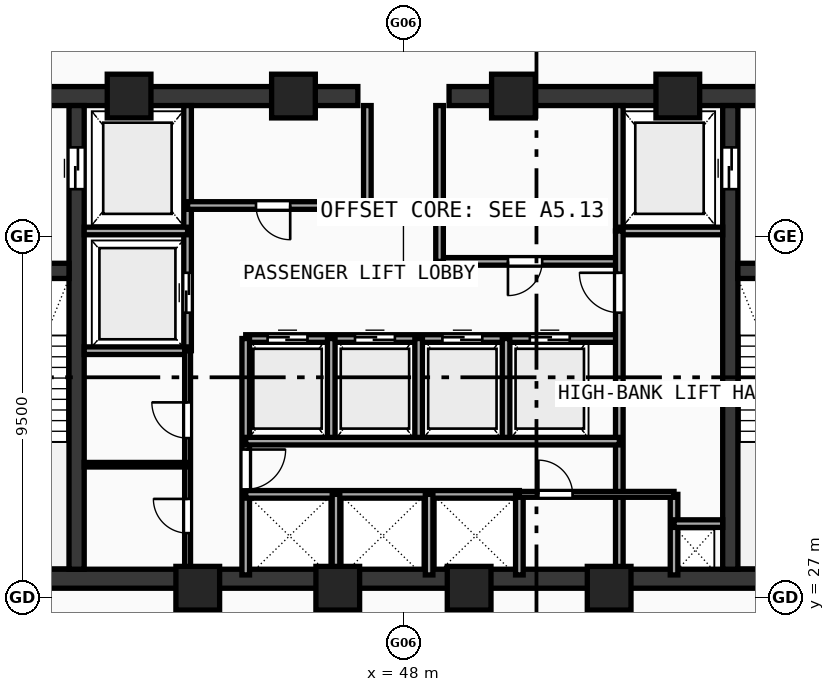
"""IFC4 building model, lengths in metres.
Left out: names, types, materials, properties, quantities, classifications, styles, units other than length and angle.
Written with IfcOpenShell. Run it as: python <this file> out.ifc"""

import sys

from ifc_helpers import new_model, si_unit, direction, frame, frame_2d, origin, origin_with_axes, origin_2d, place, context, subcontext, project, spatial, rectangle, hollow_rectangle, extrude, source, transform, mapped, element, fill, save


model = new_model("IFC4")
c1 = context("Model", 3, precision=1e-05, world=origin(), true_north=direction((0.0, 1.0)))
c2 = subcontext(c1, "Body", "Model", "MODEL_VIEW")
j1 = project(units=[si_unit("LENGTHUNIT", "METRE"), si_unit("PLANEANGLEUNIT", "RADIAN")], contexts=[c1])
p1 = place(None, origin())
s1 = spatial("IfcSite", under=j1, at=p1, CompositionType="ELEMENT")
p2 = place(p1, origin())
s2 = spatial("IfcBuilding", under=s1, at=p2, CompositionType="ELEMENT")
p3 = place(p2, frame((0.0, 0.0, 188.56)))
s3 = spatial("IfcBuildingStorey", under=s2, at=p3, CompositionType="ELEMENT", Elevation=188.56)
p4 = place(p3, frame((35.55, 27.5, 0.0), z_axis=(0.0, 0.0, 1.0), x_axis=(1.0, 0.0, 0.0)))
e1 = element("IfcWall", 1, at=p4, inside=s3, PredefinedType="SHEAR", context=c2, shape_type="SweptSolid", body=[
    extrude(rectangle(XDim=24.9, YDim=0.5, at=frame_2d((12.45, 0.0))), origin(), (0.0, 0.0, 1.0), 3.54),
])
p5 = place(p3, frame((35.55, 40.2, 0.0), z_axis=(0.0, 0.0, 1.0), x_axis=(1.0, 0.0, 0.0)))
e2 = element("IfcWall", 2, at=p5, inside=s3, PredefinedType="SHEAR", context=c2, shape_type="SweptSolid", body=[
    extrude(rectangle(XDim=11.25, YDim=0.5, at=frame_2d((5.625, 0.0))), origin(), (0.0, 0.0, 1.0), 3.54),
])
p6 = place(p5, frame((1.6, 0.0, 0.0)))
e3 = element("IfcOpeningElement", 3, at=p6, cuts=e2, PredefinedType="OPENING", context=c2, shape_type="SweptSolid", body=[
    extrude(rectangle(XDim=1.05, YDim=2.1, at=frame_2d((0.525, 1.05))), frame((0.0, 0.26, 0.0), z_axis=(0.0, -1.0, 0.0), x_axis=(1.0, 0.0, 0.0)), (0.0, 0.0, 1.0), 0.52),
])
p7 = place(p3, frame((49.2, 40.2, 0.0), z_axis=(0.0, 0.0, 1.0), x_axis=(1.0, 0.0, 0.0)))
e4 = element("IfcWall", 4, at=p7, inside=s3, PredefinedType="SHEAR", context=c2, shape_type="SweptSolid", body=[
    extrude(rectangle(XDim=11.25, YDim=0.5, at=frame_2d((5.625, 0.0))), origin(), (0.0, 0.0, 1.0), 3.54),
])
p8 = place(p7, frame((8.6, 0.0, 0.0)))
e5 = element("IfcOpeningElement", 5, at=p8, cuts=e4, PredefinedType="OPENING", context=c2, shape_type="SweptSolid", body=[
    extrude(rectangle(XDim=1.05, YDim=2.1, at=frame_2d((0.525, 1.05))), frame((0.0, 0.26, 0.0), z_axis=(0.0, -1.0, 0.0), x_axis=(1.0, 0.0, 0.0)), (0.0, 0.0, 1.0), 0.52),
])
p9 = place(p3, frame((39.4, 27.75, 0.0), z_axis=(0.0, 0.0, 1.0), x_axis=(0.0, 1.0, 0.0)))
e6 = element("IfcWall", 6, at=p9, inside=s3, PredefinedType="SHEAR", context=c2, shape_type="SweptSolid", body=[
    extrude(rectangle(XDim=12.2, YDim=0.4, at=frame_2d((6.1, 0.0))), origin(), (0.0, 0.0, 1.0), 3.54),
])
p10 = place(p9, frame((10.0, 0.0, 0.0)))
e7 = element("IfcOpeningElement", 7, at=p10, cuts=e6, PredefinedType="OPENING", context=c2, shape_type="SweptSolid", body=[
    extrude(rectangle(XDim=1.1, YDim=2.1, at=frame_2d((0.55, 1.05))), frame((0.0, 0.21, 0.0), z_axis=(0.0, -1.0, 0.0), x_axis=(1.0, 0.0, 0.0)), (0.0, 0.0, 1.0), 0.42),
])
p11 = place(p3, frame((56.6, 27.75, 0.0), z_axis=(0.0, 0.0, 1.0), x_axis=(0.0, 1.0, 0.0)))
e8 = element("IfcWall", 8, at=p11, inside=s3, PredefinedType="SHEAR", context=c2, shape_type="SweptSolid", body=[
    extrude(rectangle(XDim=12.2, YDim=0.4, at=frame_2d((6.1, 0.0))), origin(), (0.0, 0.0, 1.0), 3.54),
])
p12 = place(p11, frame((10.0, 0.0, 0.0)))
e9 = element("IfcOpeningElement", 9, at=p12, cuts=e8, PredefinedType="OPENING", context=c2, shape_type="SweptSolid", body=[
    extrude(rectangle(XDim=1.1, YDim=2.1, at=frame_2d((0.55, 1.05))), frame((0.0, 0.21, 0.0), z_axis=(0.0, -1.0, 0.0), x_axis=(1.0, 0.0, 0.0)), (0.0, 0.0, 1.0), 0.42),
])
p13 = place(p3, frame((36.05, 35.6, 0.0), z_axis=(0.0, 0.0, 1.0), x_axis=(1.0, 0.0, 0.0)))
e10 = element("IfcWall", 10, at=p13, inside=s3, PredefinedType="SHEAR", context=c2, shape_type="SweptSolid", body=[
    extrude(rectangle(XDim=3.15, YDim=0.4, at=frame_2d((1.575, 0.0))), origin(), (0.0, 0.0, 1.0), 3.54),
])
p14 = place(p13, frame((1.07, 0.0, 0.0)))
e11 = element("IfcOpeningElement", 11, at=p14, cuts=e10, PredefinedType="OPENING", context=c2, shape_type="SweptSolid", body=[
    extrude(rectangle(XDim=1.05, YDim=2.1, at=frame_2d((0.525, 1.05))), frame((0.0, 0.21, 0.0), z_axis=(0.0, -1.0, 0.0), x_axis=(1.0, 0.0, 0.0)), (0.0, 0.0, 1.0), 0.42),
])
p15 = place(p3, frame((56.8, 35.6, 0.0), z_axis=(0.0, 0.0, 1.0), x_axis=(1.0, 0.0, 0.0)))
e12 = element("IfcWall", 12, at=p15, inside=s3, PredefinedType="SHEAR", context=c2, shape_type="SweptSolid", body=[
    extrude(rectangle(XDim=3.15, YDim=0.4, at=frame_2d((1.575, 0.0))), origin(), (0.0, 0.0, 1.0), 3.54),
])
p16 = place(p15, frame((1.02, 0.0, 0.0)))
e13 = element("IfcOpeningElement", 13, at=p16, cuts=e12, PredefinedType="OPENING", context=c2, shape_type="SweptSolid", body=[
    extrude(rectangle(XDim=1.05, YDim=2.1, at=frame_2d((0.525, 1.05))), frame((0.0, 0.21, 0.0), z_axis=(0.0, -1.0, 0.0), x_axis=(1.0, 0.0, 0.0)), (0.0, 0.0, 1.0), 0.42),
])
m1 = source(origin(), c2, "Body", "SweptSolid", [
    extrude(hollow_rectangle(XDim=1.15, YDim=1.15, WallThickness=0.048, at=origin_2d()), origin(), (0.0, 0.0, 1.0), 3.8),
])
for number, where, z_axis, x_axis in (
    (14, (42.588, 27.25, -0.26), (0.0, 0.0, 1.0), (1.0, 0.0, 0.0)),
    (15, (46.272, 27.25, -0.26), (0.0, 0.0, 1.0), (1.0, 0.0, 0.0)),
    (16, (49.729, 27.25, -0.26), (0.0, 0.0, 1.0), (1.0, 0.0, 0.0)),
    (17, (53.412, 27.25, -0.26), (0.0, 0.0, 1.0), (1.0, 0.0, 0.0)),
    (18, (55.219, 40.2, -0.26), (0.0, 0.0, 1.0), (1.0, 0.0, 0.0)),
    (19, (50.894, 40.2, -0.26), (0.0, 0.0, 1.0), (1.0, 0.0, 0.0)),
    (20, (45.106, 40.2, -0.26), (0.0, 0.0, 1.0), (1.0, 0.0, 0.0)),
    (21, (40.781, 40.2, -0.26), (0.0, 0.0, 1.0), (1.0, 0.0, 0.0)),
):
    element("IfcColumn", number, at=place(p3, frame(where, z_axis=z_axis, x_axis=x_axis)), inside=s3, PredefinedType="COLUMN", context=c2, shape_type="MappedRepresentation", body=[
        mapped(m1, transform((0.0, 0.0, 0.0), scale=1.0)),
    ])
p17 = place(p3, frame((42.32, 33.5, 0.0), z_axis=(0.0, 0.0, 1.0), x_axis=(0.0, 1.0, 0.0)))
e22 = element("IfcWall", 22, at=p17, inside=s3, PredefinedType="SOLIDWALL", context=c2, shape_type="SweptSolid", body=[
    extrude(rectangle(XDim=6.45, YDim=0.2, at=frame_2d((3.225, 0.0))), origin(), (0.0, 0.0, 1.0), 3.54),
])
p18 = place(p17, frame((1.0, 0.0, 0.0)))
e23 = element("IfcOpeningElement", 23, at=p18, cuts=e22, PredefinedType="OPENING", context=c2, shape_type="SweptSolid", body=[
    extrude(rectangle(XDim=1.05, YDim=2.1, at=frame_2d((0.525, 1.05))), frame((0.0, 0.11, 0.0), z_axis=(0.0, -1.0, 0.0), x_axis=(1.0, 0.0, 0.0)), (0.0, 0.0, 1.0), 0.22),
])
for number, where, z_axis, x_axis in (
    (24, (39.6, 36.65, 0.0), (0.0, 0.0, 1.0), (1.0, 0.0, 0.0)),
    (25, (39.6, 33.5, 0.0), (0.0, 0.0, 1.0), (1.0, 0.0, 0.0)),
):
    element("IfcWall", number, at=place(p3, frame(where, z_axis=z_axis, x_axis=x_axis)), inside=s3, PredefinedType="SOLIDWALL", context=c2, shape_type="SweptSolid", body=[
        extrude(rectangle(XDim=2.72, YDim=0.2, at=frame_2d((1.36, 0.0))), origin(), (0.0, 0.0, 1.0), 3.54),
    ])
p19 = place(p3, frame((53.68, 36.65, 0.0), z_axis=(0.0, 0.0, 1.0), x_axis=(0.0, 1.0, 0.0)))
e26 = element("IfcWall", 26, at=p19, inside=s3, PredefinedType="SOLIDWALL", context=c2, shape_type="SweptSolid", body=[
    extrude(rectangle(XDim=3.3, YDim=0.2, at=frame_2d((1.65, 0.0))), origin(), (0.0, 0.0, 1.0), 3.54),
])
p20 = place(p3, frame((53.68, 36.65, 0.0), z_axis=(0.0, 0.0, 1.0), x_axis=(1.0, 0.0, 0.0)))
e27 = element("IfcWall", 27, at=p20, inside=s3, PredefinedType="SOLIDWALL", context=c2, shape_type="SweptSolid", body=[
    extrude(rectangle(XDim=2.72, YDim=0.2, at=frame_2d((1.36, 0.0))), origin(), (0.0, 0.0, 1.0), 3.54),
])
p21 = place(p3, frame((42.32, 37.32, 0.0), z_axis=(0.0, 0.0, 1.0), x_axis=(1.0, 0.0, 0.0)))
e28 = element("IfcWall", 28, at=p21, inside=s3, PredefinedType="SOLIDWALL", context=c2, shape_type="SweptSolid", body=[
    extrude(rectangle(XDim=4.73, YDim=0.2, at=frame_2d((2.365, 0.0))), origin(), (0.0, 0.0, 1.0), 3.54),
])
p22 = place(p21, frame((1.8, 0.0, 0.0)))
e29 = element("IfcOpeningElement", 29, at=p22, cuts=e28, PredefinedType="OPENING", context=c2, shape_type="SweptSolid", body=[
    extrude(rectangle(XDim=0.9, YDim=2.1, at=frame_2d((0.45, 1.05))), frame((0.0, 0.11, 0.0), z_axis=(0.0, -1.0, 0.0), x_axis=(1.0, 0.0, 0.0)), (0.0, 0.0, 1.0), 0.22),
])
p23 = place(p3, frame((48.95, 35.85, 0.0), z_axis=(0.0, 0.0, 1.0), x_axis=(1.0, 0.0, 0.0)))
e30 = element("IfcWall", 30, at=p23, inside=s3, PredefinedType="SOLIDWALL", context=c2, shape_type="SweptSolid", body=[
    extrude(rectangle(XDim=4.73, YDim=0.2, at=frame_2d((2.365, 0.0))), origin(), (0.0, 0.0, 1.0), 3.54),
])
p24 = place(p23, frame((1.8, 0.0, 0.0)))
e31 = element("IfcOpeningElement", 31, at=p24, cuts=e30, PredefinedType="OPENING", context=c2, shape_type="SweptSolid", body=[
    extrude(rectangle(XDim=0.9, YDim=2.1, at=frame_2d((0.45, 1.05))), frame((0.0, 0.11, 0.0), z_axis=(0.0, -1.0, 0.0), x_axis=(1.0, 0.0, 0.0)), (0.0, 0.0, 1.0), 0.22),
])
p25 = place(p3, frame((47.05, 37.32, 0.0), z_axis=(0.0, 0.0, 1.0), x_axis=(0.0, 1.0, 0.0)))
e32 = element("IfcWall", 32, at=p25, inside=s3, PredefinedType="SOLIDWALL", context=c2, shape_type="SweptSolid", body=[
    extrude(rectangle(XDim=2.63, YDim=0.2, at=frame_2d((1.315, 0.0))), origin(), (0.0, 0.0, 1.0), 3.54),
])
p26 = place(p3, frame((48.95, 35.85, 0.0), z_axis=(0.0, 0.0, 1.0), x_axis=(0.0, 1.0, 0.0)))
e33 = element("IfcWall", 33, at=p26, inside=s3, PredefinedType="SOLIDWALL", context=c2, shape_type="SweptSolid", body=[
    extrude(rectangle(XDim=4.1, YDim=0.2, at=frame_2d((2.05, 0.0))), origin(), (0.0, 0.0, 1.0), 3.54),
])
p27 = place(p3, frame((43.85, 33.82, 0.0), z_axis=(0.0, 0.0, 1.0), x_axis=(1.0, 0.0, 0.0)))
e34 = element("IfcWall", 34, at=p27, inside=s3, PredefinedType="SOLIDWALL", context=c2, shape_type="SweptSolid", body=[
    extrude(rectangle(XDim=9.83, YDim=0.2, at=frame_2d((4.915, 0.0))), origin(), (0.0, 0.0, 1.0), 3.54),
])
p28 = place(p27, frame((0.575, 0.0, 0.0)))
e35 = element("IfcOpeningElement", 35, at=p28, cuts=e34, PredefinedType="OPENING", context=c2, shape_type="SweptSolid", body=[
    extrude(rectangle(XDim=1.05, YDim=2.1, at=frame_2d((0.525, 1.05))), frame((0.0, 0.11, 0.0), z_axis=(0.0, -1.0, 0.0), x_axis=(1.0, 0.0, 0.0)), (0.0, 0.0, 1.0), 0.22),
])
p29 = place(p27, frame((2.875, 0.0, 0.0)))
e36 = element("IfcOpeningElement", 36, at=p29, cuts=e34, PredefinedType="OPENING", context=c2, shape_type="SweptSolid", body=[
    extrude(rectangle(XDim=1.05, YDim=2.1, at=frame_2d((0.525, 1.05))), frame((0.0, 0.11, 0.0), z_axis=(0.0, -1.0, 0.0), x_axis=(1.0, 0.0, 0.0)), (0.0, 0.0, 1.0), 0.22),
])
p30 = place(p27, frame((5.175, 0.0, 0.0)))
e37 = element("IfcOpeningElement", 37, at=p30, cuts=e34, PredefinedType="OPENING", context=c2, shape_type="SweptSolid", body=[
    extrude(rectangle(XDim=1.05, YDim=2.1, at=frame_2d((0.525, 1.05))), frame((0.0, 0.11, 0.0), z_axis=(0.0, -1.0, 0.0), x_axis=(1.0, 0.0, 0.0)), (0.0, 0.0, 1.0), 0.22),
])
p31 = place(p27, frame((7.475, 0.0, 0.0)))
e38 = element("IfcOpeningElement", 38, at=p31, cuts=e34, PredefinedType="OPENING", context=c2, shape_type="SweptSolid", body=[
    extrude(rectangle(XDim=1.05, YDim=2.1, at=frame_2d((0.525, 1.05))), frame((0.0, 0.11, 0.0), z_axis=(0.0, -1.0, 0.0), x_axis=(1.0, 0.0, 0.0)), (0.0, 0.0, 1.0), 0.22),
])
p32 = place(p3, frame((43.85, 27.6, 0.0), z_axis=(0.0, 0.0, 1.0), x_axis=(0.0, 1.0, 0.0)))
e39 = element("IfcWall", 39, at=p32, inside=s3, PredefinedType="SOLIDWALL", context=c2, shape_type="SweptSolid", body=[
    extrude(rectangle(XDim=6.22, YDim=0.2, at=frame_2d((3.11, 0.0))), origin(), (0.0, 0.0, 1.0), 3.54),
])
p33 = place(p32, frame((2.25, 0.0, 0.0)))
e40 = element("IfcOpeningElement", 40, at=p33, cuts=e39, PredefinedType="OPENING", context=c2, shape_type="SweptSolid", body=[
    extrude(rectangle(XDim=1.05, YDim=2.1, at=frame_2d((0.525, 1.05))), frame((0.0, 0.11, 0.0), z_axis=(0.0, -1.0, 0.0), x_axis=(1.0, 0.0, 0.0)), (0.0, 0.0, 1.0), 0.22),
])
p34 = place(p3, frame((53.68, 27.6, 0.0), z_axis=(0.0, 0.0, 1.0), x_axis=(0.0, 1.0, 0.0)))
e41 = element("IfcWall", 41, at=p34, inside=s3, PredefinedType="SOLIDWALL", context=c2, shape_type="SweptSolid", body=[
    extrude(rectangle(XDim=9.05, YDim=0.2, at=frame_2d((4.525, 0.0))), origin(), (0.0, 0.0, 1.0), 3.54),
])
p35 = place(p34, frame((6.9, 0.0, 0.0)))
e42 = element("IfcOpeningElement", 42, at=p35, cuts=e41, PredefinedType="OPENING", context=c2, shape_type="SweptSolid", body=[
    extrude(rectangle(XDim=1.05, YDim=2.1, at=frame_2d((0.525, 1.05))), frame((0.0, 0.11, 0.0), z_axis=(0.0, -1.0, 0.0), x_axis=(1.0, 0.0, 0.0)), (0.0, 0.0, 1.0), 0.22),
])
for number, where, z_axis, x_axis in (
    (43, (46.1, 31.12, 0.0), (0.0, 0.0, 1.0), (0.0, 1.0, 0.0)),
    (44, (48.4, 31.12, 0.0), (0.0, 0.0, 1.0), (0.0, 1.0, 0.0)),
    (45, (50.7, 31.12, 0.0), (0.0, 0.0, 1.0), (0.0, 1.0, 0.0)),
):
    element("IfcWall", number, at=place(p3, frame(where, z_axis=z_axis, x_axis=x_axis)), inside=s3, PredefinedType="SOLIDWALL", context=c2, shape_type="SweptSolid", body=[
        extrude(rectangle(XDim=2.7, YDim=0.2, at=frame_2d((1.35, 0.0))), origin(), (0.0, 0.0, 1.0), 3.54),
    ])
p36 = place(p3, frame((43.85, 29.72, 0.0), z_axis=(0.0, 0.0, 1.0), x_axis=(1.0, 0.0, 0.0)))
e46 = element("IfcWall", 46, at=p36, inside=s3, PredefinedType="SOLIDWALL", context=c2, shape_type="SweptSolid", body=[
    extrude(rectangle(XDim=7.2, YDim=0.2, at=frame_2d((3.6, 0.0))), origin(), (0.0, 0.0, 1.0), 3.54),
])
p37 = place(p3, frame((51.05, 27.6, 0.0), z_axis=(0.0, 0.0, 1.0), x_axis=(0.0, 1.0, 0.0)))
e47 = element("IfcWall", 47, at=p37, inside=s3, PredefinedType="SOLIDWALL", context=c2, shape_type="SweptSolid", body=[
    extrude(rectangle(XDim=2.12, YDim=0.2, at=frame_2d((1.06, 0.0))), origin(), (0.0, 0.0, 1.0), 3.54),
])
p38 = place(p3, frame((43.85, 31.12, 0.0), z_axis=(0.0, 0.0, 1.0), x_axis=(1.0, 0.0, 0.0)))
e48 = element("IfcWall", 48, at=p38, inside=s3, PredefinedType="SOLIDWALL", context=c2, shape_type="SweptSolid", body=[
    extrude(rectangle(XDim=9.83, YDim=0.2, at=frame_2d((4.915, 0.0))), origin(), (0.0, 0.0, 1.0), 3.54),
])
for number, where, z_axis, x_axis in (
    (49, (46.225, 27.6, 0.0), (0.0, 0.0, 1.0), (0.0, 1.0, 0.0)),
    (50, (48.675, 27.6, 0.0), (0.0, 0.0, 1.0), (0.0, 1.0, 0.0)),
    (51, (55.12, 27.6, 0.0), (0.0, 0.0, 1.0), (0.0, 1.0, 0.0)),
):
    element("IfcWall", number, at=place(p3, frame(where, z_axis=z_axis, x_axis=x_axis)), inside=s3, PredefinedType="SOLIDWALL", context=c2, shape_type="SweptSolid", body=[
        extrude(rectangle(XDim=2.12, YDim=0.2, at=frame_2d((1.06, 0.0))), origin(), (0.0, 0.0, 1.0), 3.54),
    ])
p39 = place(p3, frame((55.12, 28.95, 0.0), z_axis=(0.0, 0.0, 1.0), x_axis=(1.0, 0.0, 0.0)))
e52 = element("IfcWall", 52, at=p39, inside=s3, PredefinedType="SOLIDWALL", context=c2, shape_type="SweptSolid", body=[
    extrude(rectangle(XDim=1.28, YDim=0.2, at=frame_2d((0.64, 0.0))), origin(), (0.0, 0.0, 1.0), 3.54),
])
p40 = place(p3, frame((42.32, 27.6, 0.0), z_axis=(0.0, 0.0, 1.0), x_axis=(0.0, 1.0, 0.0)))
e53 = element("IfcWall", 53, at=p40, inside=s3, PredefinedType="PARTITIONING", context=c2, shape_type="SweptSolid", body=[
    extrude(rectangle(XDim=5.9, YDim=0.155, at=frame_2d((2.95, 0.0))), origin(), (0.0, 0.0, 1.0), 3.54),
])
p41 = place(p40, frame((1.1, 0.0, 0.0)))
e54 = element("IfcOpeningElement", 54, at=p41, cuts=e53, PredefinedType="OPENING", context=c2, shape_type="SweptSolid", body=[
    extrude(rectangle(XDim=0.9, YDim=2.1, at=frame_2d((0.45, 1.05))), frame((0.0, 0.087, 0.0), z_axis=(0.0, -1.0, 0.0), x_axis=(1.0, 0.0, 0.0)), (0.0, 0.0, 1.0), 0.175),
])
p42 = place(p40, frame((3.6, 0.0, 0.0)))
e55 = element("IfcOpeningElement", 55, at=p42, cuts=e53, PredefinedType="OPENING", context=c2, shape_type="SweptSolid", body=[
    extrude(rectangle(XDim=0.94, YDim=2.1, at=frame_2d((0.47, 1.05))), frame((0.0, 0.087, 0.0), z_axis=(0.0, -1.0, 0.0), x_axis=(1.0, 0.0, 0.0)), (0.0, 0.0, 1.0), 0.175),
])
p43 = place(p3, frame((51.05, 29.72, 0.0), z_axis=(0.0, 0.0, 1.0), x_axis=(1.0, 0.0, 0.0)))
e56 = element("IfcWall", 56, at=p43, inside=s3, PredefinedType="PARTITIONING", context=c2, shape_type="SweptSolid", body=[
    extrude(rectangle(XDim=4.07, YDim=0.155, at=frame_2d((2.035, 0.0))), origin(), (0.0, 0.0, 1.0), 3.54),
])
p44 = place(p43, frame((0.5, 0.0, 0.0)))
e57 = element("IfcOpeningElement", 57, at=p44, cuts=e56, PredefinedType="OPENING", context=c2, shape_type="SweptSolid", body=[
    extrude(rectangle(XDim=0.9, YDim=2.1, at=frame_2d((0.45, 1.05))), frame((0.0, 0.087, 0.0), z_axis=(0.0, -1.0, 0.0), x_axis=(1.0, 0.0, 0.0)), (0.0, 0.0, 1.0), 0.175),
])
p45 = place(p3, frame((39.6, 30.5, 0.0), z_axis=(0.0, 0.0, 1.0), x_axis=(1.0, 0.0, 0.0)))
e58 = element("IfcWall", 58, at=p45, inside=s3, PredefinedType="PARTITIONING", context=c2, shape_type="SweptSolid", body=[
    extrude(rectangle(XDim=2.72, YDim=0.12, at=frame_2d((1.36, 0.0))), origin(), (0.0, 0.0, 1.0), 3.54),
])
m2 = source(origin(), c2, "Body", "SweptSolid", [
    extrude(rectangle(XDim=1.1, YDim=2.1, at=frame_2d((0.55, 1.05))), frame((0.0, 0.025, 0.0), z_axis=(0.0, -1.0, 0.0), x_axis=(1.0, 0.0, 0.0)), (0.0, 0.0, 1.0), 0.05),
])
p46 = place(p10, frame((1.1, 0.0, 0.0), z_axis=(0.0, 0.0, 1.0), x_axis=(-1.0, 0.0, 0.0)))
e59 = element("IfcDoor", 59, at=p46, inside=s3, OperationType="DOUBLE_DOOR_SLIDING", PredefinedType="DOOR", context=c2, shape_type="MappedRepresentation", body=[
    mapped(m2, transform((0.0, 0.0, 0.0), scale=1.0)),
])
fill(e7, e59)
p47 = place(p12, origin_with_axes())
e60 = element("IfcDoor", 60, at=p47, inside=s3, OperationType="DOUBLE_DOOR_SLIDING", PredefinedType="DOOR", context=c2, shape_type="MappedRepresentation", body=[
    mapped(m2, transform((0.0, 0.0, 0.0), scale=1.0)),
])
fill(e9, e60)
m3 = source(origin(), c2, "Body", "SweptSolid", [
    extrude(rectangle(XDim=1.05, YDim=2.1, at=frame_2d((0.525, 1.05))), frame((0.0, 0.025, 0.0), z_axis=(0.0, -1.0, 0.0), x_axis=(1.0, 0.0, 0.0)), (0.0, 0.0, 1.0), 0.05),
])
p48 = place(p18, origin_with_axes())
e61 = element("IfcDoor", 61, at=p48, inside=s3, OperationType="DOUBLE_DOOR_SLIDING", PredefinedType="DOOR", context=c2, shape_type="MappedRepresentation", body=[
    mapped(m3, transform((0.0, 0.0, 0.0), scale=1.0)),
])
fill(e23, e61)
m4 = source(origin(), c2, "Body", "SweptSolid", [
    extrude(rectangle(XDim=0.9, YDim=2.1, at=frame_2d((0.45, 1.05))), frame((0.0, 0.025, 0.0), z_axis=(0.0, -1.0, 0.0), x_axis=(1.0, 0.0, 0.0)), (0.0, 0.0, 1.0), 0.05),
])
p49 = place(p22, frame((0.9, 0.0, 0.0), z_axis=(0.0, 0.0, 1.0), x_axis=(-1.0, 0.0, 0.0)))
e62 = element("IfcDoor", 62, at=p49, inside=s3, OperationType="SINGLE_SWING_LEFT", PredefinedType="DOOR", context=c2, shape_type="MappedRepresentation", body=[
    mapped(m4, transform((0.0, 0.0, 0.0), scale=1.0)),
])
fill(e29, e62)
p50 = place(p24, frame((0.9, 0.0, 0.0), z_axis=(0.0, 0.0, 1.0), x_axis=(-1.0, 0.0, 0.0)))
e63 = element("IfcDoor", 63, at=p50, inside=s3, OperationType="SINGLE_SWING_RIGHT", PredefinedType="DOOR", context=c2, shape_type="MappedRepresentation", body=[
    mapped(m4, transform((0.0, 0.0, 0.0), scale=1.0)),
])
fill(e31, e63)
p51 = place(p28, origin_with_axes())
e64 = element("IfcDoor", 64, at=p51, inside=s3, OperationType="DOUBLE_DOOR_SLIDING", PredefinedType="DOOR", context=c2, shape_type="MappedRepresentation", body=[
    mapped(m3, transform((0.0, 0.0, 0.0), scale=1.0)),
])
fill(e35, e64)
p52 = place(p29, origin_with_axes())
e65 = element("IfcDoor", 65, at=p52, inside=s3, OperationType="DOUBLE_DOOR_SLIDING", PredefinedType="DOOR", context=c2, shape_type="MappedRepresentation", body=[
    mapped(m3, transform((0.0, 0.0, 0.0), scale=1.0)),
])
fill(e36, e65)
p53 = place(p30, origin_with_axes())
e66 = element("IfcDoor", 66, at=p53, inside=s3, OperationType="DOUBLE_DOOR_SLIDING", PredefinedType="DOOR", context=c2, shape_type="MappedRepresentation", body=[
    mapped(m3, transform((0.0, 0.0, 0.0), scale=1.0)),
])
fill(e37, e66)
p54 = place(p31, origin_with_axes())
e67 = element("IfcDoor", 67, at=p54, inside=s3, OperationType="DOUBLE_DOOR_SLIDING", PredefinedType="DOOR", context=c2, shape_type="MappedRepresentation", body=[
    mapped(m3, transform((0.0, 0.0, 0.0), scale=1.0)),
])
fill(e38, e67)
p55 = place(p33, frame((1.05, 0.0, 0.0), z_axis=(0.0, 0.0, 1.0), x_axis=(-1.0, 0.0, 0.0)))
e68 = element("IfcDoor", 68, at=p55, inside=s3, OperationType="SINGLE_SWING_LEFT", PredefinedType="DOOR", context=c2, shape_type="MappedRepresentation", body=[
    mapped(m3, transform((0.0, 0.0, 0.0), scale=1.0)),
])
fill(e40, e68)
p56 = place(p35, origin_with_axes())
e69 = element("IfcDoor", 69, at=p56, inside=s3, OperationType="SINGLE_SWING_RIGHT", PredefinedType="DOOR", context=c2, shape_type="MappedRepresentation", body=[
    mapped(m3, transform((0.0, 0.0, 0.0), scale=1.0)),
])
fill(e42, e69)
p57 = place(p41, origin_with_axes())
e70 = element("IfcDoor", 70, at=p57, inside=s3, OperationType="SINGLE_SWING_RIGHT", PredefinedType="DOOR", context=c2, shape_type="MappedRepresentation", body=[
    mapped(m4, transform((0.0, 0.0, 0.0), scale=1.0)),
])
fill(e54, e70)
m5 = source(origin(), c2, "Body", "SweptSolid", [
    extrude(rectangle(XDim=0.94, YDim=2.1, at=frame_2d((0.47, 1.05))), frame((0.0, 0.025, 0.0), z_axis=(0.0, -1.0, 0.0), x_axis=(1.0, 0.0, 0.0)), (0.0, 0.0, 1.0), 0.05),
])
p58 = place(p42, origin_with_axes())
e71 = element("IfcDoor", 71, at=p58, inside=s3, OperationType="SINGLE_SWING_RIGHT", PredefinedType="DOOR", context=c2, shape_type="MappedRepresentation", body=[
    mapped(m5, transform((0.0, 0.0, 0.0), scale=1.0)),
])
fill(e55, e71)
p59 = place(p44, origin_with_axes())
e72 = element("IfcDoor", 72, at=p59, inside=s3, OperationType="SINGLE_SWING_LEFT", PredefinedType="DOOR", context=c2, shape_type="MappedRepresentation", body=[
    mapped(m4, transform((0.0, 0.0, 0.0), scale=1.0)),
])
fill(e57, e72)
save(model, sys.argv[1])
